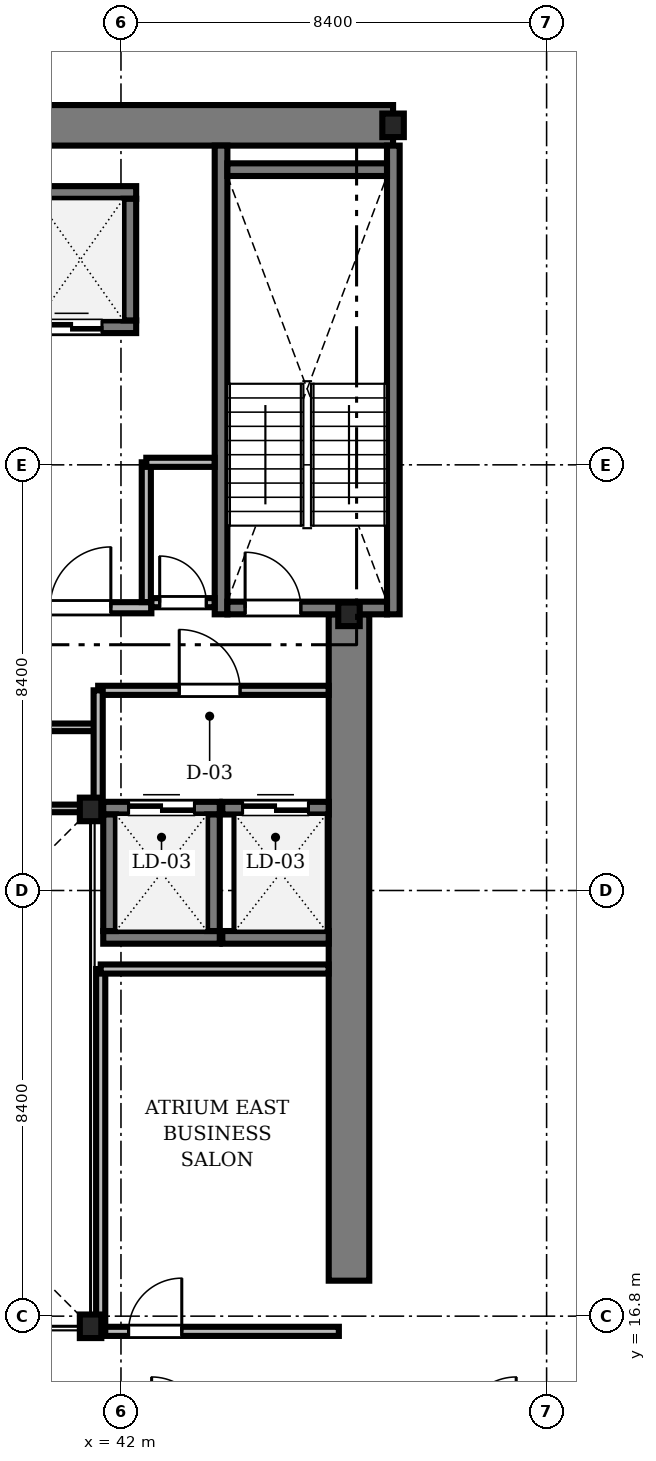
"""IFC4 building model, lengths in metres.
Left out: names, types, materials, properties, quantities, classifications, styles, units other than length and angle.
Written with IfcOpenShell. Run it as: python <this file> out.ifc"""

import sys

from ifc_helpers import new_model, si_unit, direction, frame, frame_2d, origin, origin_2d, place, context, subcontext, project, spatial, rectangle, i_section, extrude, source, transform, mapped, element, fill, save


model = new_model("IFC4")
c1 = context("Model", 3, precision=1e-05, world=origin(), true_north=direction((0.0, 1.0)))
c2 = subcontext(c1, "Body", "Model", "MODEL_VIEW")
j1 = project(units=[si_unit("LENGTHUNIT", "METRE"), si_unit("PLANEANGLEUNIT", "RADIAN")], contexts=[c1])
p1 = place(None, origin())
s1 = spatial("IfcSite", under=j1, at=p1, CompositionType="ELEMENT")
p2 = place(p1, origin())
s2 = spatial("IfcBuilding", under=s1, at=p2, CompositionType="ELEMENT")
p3 = place(p2, frame((0.0, 0.0, 107.5)))
s3 = spatial("IfcBuildingStorey", under=s2, at=p3, CompositionType="ELEMENT", Elevation=107.5)
m1 = source(origin(), c2, "Body", "SweptSolid", [
    extrude(rectangle(XDim=17.52, YDim=0.8, at=frame_2d((8.76, 0.0))), origin(), (0.0, 0.0, 1.0), 3.56),
])
p4 = place(p3, frame((29.85, 40.3, 0.0), z_axis=(0.0, 0.0, 1.0), x_axis=(1.0, 0.0, 0.0)))
e1 = element("IfcWall", 1, at=p4, inside=s3, PredefinedType="SHEAR", context=c2, shape_type="MappedRepresentation", body=[
    mapped(m1, transform((0.0, 0.0, 0.0), scale=1.0)),
])
m2 = source(origin(), c2, "Body", "SweptSolid", [
    extrude(rectangle(XDim=13.15, YDim=0.8, at=frame_2d((6.575, 0.0))), origin(), (0.0, 0.0, 1.0), 3.56),
])
p5 = place(p3, frame((46.5, 17.5, 0.0), z_axis=(0.0, 0.0, 1.0), x_axis=(0.0, 1.0, 0.0)))
e2 = element("IfcWall", 2, at=p5, inside=s3, PredefinedType="SHEAR", context=c2, shape_type="MappedRepresentation", body=[
    mapped(m2, transform((0.0, 0.0, 0.0), scale=1.0)),
])
m3 = source(origin(), c2, "Body", "SweptSolid", [
    extrude(i_section(OverallWidth=0.424, OverallDepth=0.465, WebThickness=0.035, FlangeThickness=0.056, FilletRadius=0.015, at=origin_2d()), origin(), (0.0, 0.0, 1.0), 3.56),
])
for number, where, z_axis, x_axis in (
    (3, (41.4, 16.6, 0.0), (0.0, 0.0, 1.0), (1.0, 0.0, 0.0)),
    (4, (41.4, 26.8, 0.0), (0.0, 0.0, 1.0), (1.0, 0.0, 0.0)),
    (5, (46.5, 30.65, 0.0), (0.0, 0.0, 1.0), (1.0, 0.0, 0.0)),
    (6, (47.37, 40.3, 0.0), (0.0, 0.0, 1.0), (1.0, 0.0, 0.0)),
):
    element("IfcColumn", number, at=place(p3, frame(where, z_axis=z_axis, x_axis=x_axis)), inside=s3, PredefinedType="COLUMN", context=c2, shape_type="MappedRepresentation", body=[
        mapped(m3, transform((0.0, 0.0, 0.0), scale=1.0)),
    ])
m4 = source(origin(), c2, "Body", "SweptSolid", [
    extrude(rectangle(XDim=9.25, YDim=0.25, at=frame_2d((4.625, 0.0))), origin(), (0.0, 0.0, 1.0), 3.6),
])
for number, where, z_axis, x_axis in (
    (7, (43.975, 30.65, 0.0), (0.0, 0.0, 1.0), (0.0, 1.0, 0.0)),
    (8, (47.375, 30.65, 0.0), (0.0, 0.0, 1.0), (0.0, 1.0, 0.0)),
):
    element("IfcWall", number, at=place(p3, frame(where, z_axis=z_axis, x_axis=x_axis)), inside=s3, PredefinedType="SOLIDWALL", context=c2, shape_type="MappedRepresentation", body=[
        mapped(m4, transform((0.0, 0.0, 0.0), scale=1.0)),
    ])
m5 = source(origin(), c2, "Body", "SweptSolid", [
    extrude(rectangle(XDim=3.15, YDim=0.25, at=frame_2d((1.575, 0.0))), origin(), (0.0, 0.0, 1.0), 3.6),
])
p6 = place(p3, frame((44.1, 39.425, 0.0), z_axis=(0.0, 0.0, 1.0), x_axis=(1.0, 0.0, 0.0)))
e9 = element("IfcWall", 9, at=p6, inside=s3, PredefinedType="SOLIDWALL", context=c2, shape_type="MappedRepresentation", body=[
    mapped(m5, transform((0.0, 0.0, 0.0), scale=1.0)),
])
p7 = place(p3, frame((44.1, 30.775, 0.0), z_axis=(0.0, 0.0, 1.0), x_axis=(1.0, 0.0, 0.0)))
e10 = element("IfcWall", 10, at=p7, inside=s3, PredefinedType="SOLIDWALL", context=c2, shape_type="MappedRepresentation", body=[
    mapped(m5, transform((0.0, 0.0, 0.0), scale=1.0)),
])
m6 = source(origin(), c2, "Body", "SweptSolid", [
    extrude(rectangle(XDim=1.1, YDim=2.2, at=frame_2d((0.55, 1.1))), frame((0.0, 0.135, 0.0), z_axis=(0.0, -1.0, 0.0), x_axis=(1.0, 0.0, 0.0)), (0.0, 0.0, 1.0), 0.27),
])
p8 = place(p7, frame((0.35, 0.0, 0.0)))
e11 = element("IfcOpeningElement", 11, at=p8, cuts=e10, PredefinedType="OPENING", context=c2, shape_type="MappedRepresentation", body=[
    mapped(m6, transform((0.0, 0.0, 0.0), scale=1.0)),
])
m7 = source(origin(), c2, "Body", "SweptSolid", [
    extrude(rectangle(XDim=2.8, YDim=0.22, at=frame_2d((1.4, 0.0))), origin(), (0.0, 0.0, 1.0), 3.56),
])
p9 = place(p3, frame((39.8, 30.78, 0.0), z_axis=(0.0, 0.0, 1.0), x_axis=(1.0, 0.0, 0.0)))
e12 = element("IfcWall", 12, at=p9, inside=s3, PredefinedType="SOLIDWALL", context=c2, shape_type="MappedRepresentation", body=[
    mapped(m7, transform((0.0, 0.0, 0.0), scale=1.0)),
])
m8 = source(origin(), c2, "Body", "SweptSolid", [
    extrude(rectangle(XDim=1.2, YDim=2.2, at=frame_2d((0.6, 1.1))), frame((0.0, 0.12, 0.0), z_axis=(0.0, -1.0, 0.0), x_axis=(1.0, 0.0, 0.0)), (0.0, 0.0, 1.0), 0.24),
])
p10 = place(p9, frame((0.8, 0.0, 0.0)))
e13 = element("IfcOpeningElement", 13, at=p10, cuts=e12, PredefinedType="OPENING", context=c2, shape_type="MappedRepresentation", body=[
    mapped(m8, transform((0.0, 0.0, 0.0), scale=1.0)),
])
m9 = source(origin(), c2, "Body", "SweptSolid", [
    extrude(rectangle(XDim=2.55, YDim=0.25, at=frame_2d((1.275, 0.0))), origin(), (0.0, 0.0, 1.0), 3.56),
])
p11 = place(p3, frame((39.75, 36.325, 0.0), z_axis=(0.0, 0.0, 1.0), x_axis=(1.0, 0.0, 0.0)))
e14 = element("IfcWall", 14, at=p11, inside=s3, PredefinedType="SOLIDWALL", context=c2, shape_type="MappedRepresentation", body=[
    mapped(m9, transform((0.0, 0.0, 0.0), scale=1.0)),
])
m10 = source(origin(), c2, "Body", "SweptSolid", [
    extrude(rectangle(XDim=1.2, YDim=2.25, at=frame_2d((0.6, 1.125))), frame((0.0, 0.135, 0.0), z_axis=(0.0, -1.0, 0.0), x_axis=(1.0, 0.0, 0.0)), (0.0, 0.0, 1.0), 0.27),
])
p12 = place(p11, frame((0.675, 0.0, 0.0)))
e15 = element("IfcOpeningElement", 15, at=p12, cuts=e14, PredefinedType="OPENING", context=c2, shape_type="MappedRepresentation", body=[
    mapped(m10, transform((0.0, 0.0, 0.0), scale=1.0)),
])
p13 = place(p3, frame((39.75, 38.975, 0.0), z_axis=(0.0, 0.0, 1.0), x_axis=(1.0, 0.0, 0.0)))
e16 = element("IfcWall", 16, at=p13, inside=s3, PredefinedType="SOLIDWALL", context=c2, shape_type="MappedRepresentation", body=[
    mapped(m9, transform((0.0, 0.0, 0.0), scale=1.0)),
])
m11 = source(origin(), c2, "Body", "SweptSolid", [
    extrude(rectangle(XDim=2.4, YDim=0.25, at=frame_2d((1.2, 0.0))), origin(), (0.0, 0.0, 1.0), 3.56),
])
p14 = place(p3, frame((42.175, 36.45, 0.0), z_axis=(0.0, 0.0, 1.0), x_axis=(0.0, 1.0, 0.0)))
e17 = element("IfcWall", 17, at=p14, inside=s3, PredefinedType="SOLIDWALL", context=c2, shape_type="MappedRepresentation", body=[
    mapped(m11, transform((0.0, 0.0, 0.0), scale=1.0)),
])
m12 = source(origin(), c2, "Body", "SweptSolid", [
    extrude(rectangle(XDim=2.3, YDim=0.25, at=frame_2d((1.15, 0.0))), origin(), (0.0, 0.0, 1.0), 3.56),
])
p15 = place(p3, frame((41.65, 24.275, 0.0), z_axis=(0.0, 0.0, 1.0), x_axis=(1.0, 0.0, 0.0)))
e18 = element("IfcWall", 18, at=p15, inside=s3, PredefinedType="SOLIDWALL", context=c2, shape_type="MappedRepresentation", body=[
    mapped(m12, transform((0.0, 0.0, 0.0), scale=1.0)),
])
p16 = place(p3, frame((41.65, 26.825, 0.0), z_axis=(0.0, 0.0, 1.0), x_axis=(1.0, 0.0, 0.0)))
e19 = element("IfcWall", 19, at=p16, inside=s3, PredefinedType="SOLIDWALL", context=c2, shape_type="MappedRepresentation", body=[
    mapped(m12, transform((0.0, 0.0, 0.0), scale=1.0)),
])
m13 = source(origin(), c2, "Body", "SweptSolid", [
    extrude(rectangle(XDim=1.3, YDim=2.3, at=frame_2d((0.65, 1.15))), frame((0.0, 0.135, 0.0), z_axis=(0.0, -1.0, 0.0), x_axis=(1.0, 0.0, 0.0)), (0.0, 0.0, 1.0), 0.27),
])
p17 = place(p16, frame((0.5, 0.0, 0.0)))
e20 = element("IfcOpeningElement", 20, at=p17, cuts=e19, PredefinedType="OPENING", context=c2, shape_type="MappedRepresentation", body=[
    mapped(m13, transform((0.0, 0.0, 0.0), scale=1.0)),
])
for number, where, z_axis, x_axis in (
    (21, (41.775, 24.4, 0.0), (0.0, 0.0, 1.0), (0.0, 1.0, 0.0)),
    (22, (43.825, 24.4, 0.0), (0.0, 0.0, 1.0), (0.0, 1.0, 0.0)),
):
    element("IfcWall", number, at=place(p3, frame(where, z_axis=z_axis, x_axis=x_axis)), inside=s3, PredefinedType="SOLIDWALL", context=c2, shape_type="MappedRepresentation", body=[
        mapped(m12, transform((0.0, 0.0, 0.0), scale=1.0)),
    ])
m14 = source(origin(), c2, "Body", "SweptSolid", [
    extrude(rectangle(XDim=2.1, YDim=0.25, at=frame_2d((1.05, 0.0))), origin(), (0.0, 0.0, 1.0), 3.56),
])
p18 = place(p3, frame((44.0, 24.275, 0.0), z_axis=(0.0, 0.0, 1.0), x_axis=(1.0, 0.0, 0.0)))
e23 = element("IfcWall", 23, at=p18, inside=s3, PredefinedType="SOLIDWALL", context=c2, shape_type="MappedRepresentation", body=[
    mapped(m14, transform((0.0, 0.0, 0.0), scale=1.0)),
])
p19 = place(p3, frame((44.0, 26.825, 0.0), z_axis=(0.0, 0.0, 1.0), x_axis=(1.0, 0.0, 0.0)))
e24 = element("IfcWall", 24, at=p19, inside=s3, PredefinedType="SOLIDWALL", context=c2, shape_type="MappedRepresentation", body=[
    mapped(m14, transform((0.0, 0.0, 0.0), scale=1.0)),
])
p20 = place(p19, frame((0.4, 0.0, 0.0)))
e25 = element("IfcOpeningElement", 25, at=p20, cuts=e24, PredefinedType="OPENING", context=c2, shape_type="MappedRepresentation", body=[
    mapped(m13, transform((0.0, 0.0, 0.0), scale=1.0)),
])
m15 = source(origin(), c2, "Body", "SweptSolid", [
    extrude(rectangle(XDim=4.548, YDim=0.18, at=frame_2d((2.274, 0.0))), origin(), (0.0, 0.0, 1.0), 3.192),
])
p21 = place(p3, frame((41.55, 29.15, 0.0), z_axis=(0.0, 0.0, 1.0), x_axis=(1.0, 0.0, 0.0)))
e26 = element("IfcWall", 26, at=p21, inside=s3, PredefinedType="PARTITIONING", context=c2, shape_type="MappedRepresentation", body=[
    mapped(m15, transform((0.0, 0.0, 0.0), scale=1.0)),
])
m16 = source(origin(), c2, "Body", "SweptSolid", [
    extrude(rectangle(XDim=1.2, YDim=2.2, at=frame_2d((0.6, 1.1))), frame((0.0, 0.1, 0.0), z_axis=(0.0, -1.0, 0.0), x_axis=(1.0, 0.0, 0.0)), (0.0, 0.0, 1.0), 0.2),
])
p22 = place(p21, frame((1.6, 0.0, 0.0)))
e27 = element("IfcOpeningElement", 27, at=p22, cuts=e26, PredefinedType="OPENING", context=c2, shape_type="MappedRepresentation", body=[
    mapped(m16, transform((0.0, 0.0, 0.0), scale=1.0)),
])
m17 = source(origin(), c2, "Body", "SweptSolid", [
    extrude(rectangle(XDim=4.7, YDim=0.18, at=frame_2d((2.35, 0.0))), origin(), (0.0, 0.0, 1.0), 2.952),
])
p23 = place(p3, frame((41.6, 16.5, 0.0), z_axis=(0.0, 0.0, 1.0), x_axis=(1.0, 0.0, 0.0)))
e28 = element("IfcWall", 28, at=p23, inside=s3, PredefinedType="PARTITIONING", context=c2, shape_type="MappedRepresentation", body=[
    mapped(m17, transform((0.0, 0.0, 0.0), scale=1.0)),
])
m18 = source(origin(), c2, "Body", "SweptSolid", [
    extrude(rectangle(XDim=1.05, YDim=2.2, at=frame_2d((0.525, 1.1))), frame((0.0, 0.1, 0.0), z_axis=(0.0, -1.0, 0.0), x_axis=(1.0, 0.0, 0.0)), (0.0, 0.0, 1.0), 0.2),
])
p24 = place(p23, frame((0.55, 0.0, 0.0)))
e29 = element("IfcOpeningElement", 29, at=p24, cuts=e28, PredefinedType="OPENING", context=c2, shape_type="MappedRepresentation", body=[
    mapped(m18, transform((0.0, 0.0, 0.0), scale=1.0)),
])
m19 = source(origin(), c2, "Body", "SweptSolid", [
    extrude(rectangle(XDim=2.74, YDim=0.15, at=frame_2d((1.37, 0.0))), origin(), (0.0, 0.0, 1.0), 3.56),
])
p25 = place(p3, frame((38.78, 28.42, 0.0), z_axis=(0.0, 0.0, 1.0), x_axis=(1.0, 0.0, 0.0)))
e30 = element("IfcWall", 30, at=p25, inside=s3, PredefinedType="PARTITIONING", context=c2, shape_type="MappedRepresentation", body=[
    mapped(m19, transform((0.0, 0.0, 0.0), scale=1.0)),
])
m20 = source(origin(), c2, "Body", "SweptSolid", [
    extrude(rectangle(XDim=0.92, YDim=2.1, at=frame_2d((0.46, 1.05))), frame((0.0, 0.085, 0.0), z_axis=(0.0, -1.0, 0.0), x_axis=(1.0, 0.0, 0.0)), (0.0, 0.0, 1.0), 0.17),
])
p26 = place(p25, frame((0.63, 0.0, 0.0)))
e31 = element("IfcOpeningElement", 31, at=p26, cuts=e30, PredefinedType="OPENING", context=c2, shape_type="MappedRepresentation", body=[
    mapped(m20, transform((0.0, 0.0, 0.0), scale=1.0)),
])
m21 = source(origin(), c2, "Body", "SweptSolid", [
    extrude(rectangle(XDim=1.248, YDim=0.18, at=frame_2d((0.624, 0.0))), origin(), (0.0, 0.0, 1.0), 3.56),
])
p27 = place(p3, frame((42.6, 30.88, 0.0), z_axis=(0.0, 0.0, 1.0), x_axis=(1.0, 0.0, 0.0)))
e32 = element("IfcWall", 32, at=p27, inside=s3, PredefinedType="PARTITIONING", context=c2, shape_type="MappedRepresentation", body=[
    mapped(m21, transform((0.0, 0.0, 0.0), scale=1.0)),
])
m22 = source(origin(), c2, "Body", "SweptSolid", [
    extrude(rectangle(XDim=0.92, YDim=2.1, at=frame_2d((0.46, 1.05))), frame((0.0, 0.1, 0.0), z_axis=(0.0, -1.0, 0.0), x_axis=(1.0, 0.0, 0.0)), (0.0, 0.0, 1.0), 0.2),
])
p28 = place(p27, frame((0.164, 0.0, 0.0)))
e33 = element("IfcOpeningElement", 33, at=p28, cuts=e32, PredefinedType="OPENING", context=c2, shape_type="MappedRepresentation", body=[
    mapped(m22, transform((0.0, 0.0, 0.0), scale=1.0)),
])
m23 = source(origin(), c2, "Body", "SweptSolid", [
    extrude(rectangle(XDim=7.15, YDim=0.18, at=frame_2d((3.575, 0.0))), origin(), (0.0, 0.0, 1.0), 2.952),
])
p29 = place(p3, frame((41.6, 16.5, 0.0), z_axis=(0.0, 0.0, 1.0), x_axis=(0.0, 1.0, 0.0)))
e34 = element("IfcWall", 34, at=p29, inside=s3, PredefinedType="PARTITIONING", context=c2, shape_type="MappedRepresentation", body=[
    mapped(m23, transform((0.0, 0.0, 0.0), scale=1.0)),
])
m24 = source(origin(), c2, "Body", "SweptSolid", [
    extrude(rectangle(XDim=4.498, YDim=0.18, at=frame_2d((2.249, 0.0))), origin(), (0.0, 0.0, 1.0), 3.56),
])
p30 = place(p3, frame((41.6, 23.65, 0.0), z_axis=(0.0, 0.0, 1.0), x_axis=(1.0, 0.0, 0.0)))
e35 = element("IfcWall", 35, at=p30, inside=s3, PredefinedType="PARTITIONING", context=c2, shape_type="MappedRepresentation", body=[
    mapped(m24, transform((0.0, 0.0, 0.0), scale=1.0)),
])
m25 = source(origin(), c2, "Body", "SweptSolid", [
    extrude(rectangle(XDim=2.758, YDim=0.18, at=frame_2d((1.379, 0.0))), origin(), (0.0, 0.0, 1.0), 3.56),
])
p31 = place(p3, frame((42.5, 30.892, 0.0), z_axis=(0.0, 0.0, 1.0), x_axis=(0.0, 1.0, 0.0)))
e36 = element("IfcWall", 36, at=p31, inside=s3, PredefinedType="PARTITIONING", context=c2, shape_type="MappedRepresentation", body=[
    mapped(m25, transform((0.0, 0.0, 0.0), scale=1.0)),
])
m26 = source(origin(), c2, "Body", "SweptSolid", [
    extrude(rectangle(XDim=2.74, YDim=0.15, at=frame_2d((1.37, 0.0))), origin(), (0.0, 0.0, 1.0), 2.952),
])
p32 = place(p3, frame((38.78, 26.82, 0.0), z_axis=(0.0, 0.0, 1.0), x_axis=(1.0, 0.0, 0.0)))
e37 = element("IfcWall", 37, at=p32, inside=s3, PredefinedType="PARTITIONING", context=c2, shape_type="MappedRepresentation", body=[
    mapped(m26, transform((0.0, 0.0, 0.0), scale=1.0)),
])
m27 = source(origin(), c2, "Body", "SweptSolid", [
    extrude(rectangle(XDim=2.35, YDim=0.18, at=frame_2d((1.175, 0.0))), origin(), (0.0, 0.0, 1.0), 2.952),
])
p33 = place(p3, frame((41.55, 26.8, 0.0), z_axis=(0.0, 0.0, 1.0), x_axis=(0.0, 1.0, 0.0)))
e38 = element("IfcWall", 38, at=p33, inside=s3, PredefinedType="PARTITIONING", context=c2, shape_type="MappedRepresentation", body=[
    mapped(m27, transform((0.0, 0.0, 0.0), scale=1.0)),
])
m28 = source(origin(), c2, "Body", "SweptSolid", [
    extrude(rectangle(XDim=1.348, YDim=0.18, at=frame_2d((0.674, 0.0))), origin(), (0.0, 0.0, 1.0), 3.56),
])
p34 = place(p3, frame((42.5, 33.65, 0.0), z_axis=(0.0, 0.0, 1.0), x_axis=(1.0, 0.0, 0.0)))
e39 = element("IfcWall", 39, at=p34, inside=s3, PredefinedType="PARTITIONING", context=c2, shape_type="MappedRepresentation", body=[
    mapped(m28, transform((0.0, 0.0, 0.0), scale=1.0)),
])
m29 = source(origin(), c2, "Body", "SweptSolid", [
    extrude(rectangle(XDim=1.1, YDim=2.2, at=frame_2d((0.55, 1.1))), frame((0.0, 0.025, 0.0), z_axis=(0.0, -1.0, 0.0), x_axis=(1.0, 0.0, 0.0)), (0.0, 0.0, 1.0), 0.05),
])
p35 = place(p8, origin())
e40 = element("IfcDoor", 40, at=p35, inside=s3, OperationType="SINGLE_SWING_LEFT", PredefinedType="DOOR", context=c2, shape_type="MappedRepresentation", body=[
    mapped(m29, transform((0.0, 0.0, 0.0), scale=1.0)),
])
fill(e11, e40)
m30 = source(origin(), c2, "Body", "SweptSolid", [
    extrude(rectangle(XDim=1.2, YDim=2.2, at=frame_2d((0.6, 1.1))), frame((0.0, 0.025, 0.0), z_axis=(0.0, -1.0, 0.0), x_axis=(1.0, 0.0, 0.0)), (0.0, 0.0, 1.0), 0.05),
])
p36 = place(p10, origin())
e41 = element("IfcDoor", 41, at=p36, inside=s3, OperationType="SINGLE_SWING_RIGHT", PredefinedType="DOOR", context=c2, shape_type="MappedRepresentation", body=[
    mapped(m30, transform((0.0, 0.0, 0.0), scale=1.0)),
])
fill(e13, e41)
m31 = source(origin(), c2, "Body", "SweptSolid", [
    extrude(rectangle(XDim=1.2, YDim=2.25, at=frame_2d((0.6, 1.125))), frame((0.0, 0.025, 0.0), z_axis=(0.0, -1.0, 0.0), x_axis=(1.0, 0.0, 0.0)), (0.0, 0.0, 1.0), 0.05),
])
p37 = place(p12, origin())
e42 = element("IfcDoor", 42, at=p37, inside=s3, OperationType="DOUBLE_DOOR_SLIDING", PredefinedType="DOOR", context=c2, shape_type="MappedRepresentation", body=[
    mapped(m31, transform((0.0, 0.0, 0.0), scale=1.0)),
])
fill(e15, e42)
m32 = source(origin(), c2, "Body", "SweptSolid", [
    extrude(rectangle(XDim=1.3, YDim=2.3, at=frame_2d((0.65, 1.15))), frame((0.0, 0.025, 0.0), z_axis=(0.0, -1.0, 0.0), x_axis=(1.0, 0.0, 0.0)), (0.0, 0.0, 1.0), 0.05),
])
p38 = place(p17, origin())
e43 = element("IfcDoor", 43, at=p38, inside=s3, OperationType="DOUBLE_DOOR_SLIDING", PredefinedType="DOOR", context=c2, shape_type="MappedRepresentation", body=[
    mapped(m32, transform((0.0, 0.0, 0.0), scale=1.0)),
])
fill(e20, e43)
p39 = place(p20, origin())
e44 = element("IfcDoor", 44, at=p39, inside=s3, OperationType="DOUBLE_DOOR_SLIDING", PredefinedType="DOOR", context=c2, shape_type="MappedRepresentation", body=[
    mapped(m32, transform((0.0, 0.0, 0.0), scale=1.0)),
])
fill(e25, e44)
p40 = place(p22, origin())
e45 = element("IfcDoor", 45, at=p40, inside=s3, OperationType="SINGLE_SWING_LEFT", PredefinedType="DOOR", context=c2, shape_type="MappedRepresentation", body=[
    mapped(m30, transform((0.0, 0.0, 0.0), scale=1.0)),
])
fill(e27, e45)
m33 = source(origin(), c2, "Body", "SweptSolid", [
    extrude(rectangle(XDim=1.05, YDim=2.2, at=frame_2d((0.525, 1.1))), frame((0.0, 0.025, 0.0), z_axis=(0.0, -1.0, 0.0), x_axis=(1.0, 0.0, 0.0)), (0.0, 0.0, 1.0), 0.05),
])
p41 = place(p24, origin())
e46 = element("IfcDoor", 46, at=p41, inside=s3, OperationType="SINGLE_SWING_RIGHT", PredefinedType="DOOR", context=c2, shape_type="MappedRepresentation", body=[
    mapped(m33, transform((0.0, 0.0, 0.0), scale=1.0)),
])
fill(e29, e46)
m34 = source(origin(), c2, "Body", "SweptSolid", [
    extrude(rectangle(XDim=0.92, YDim=2.1, at=frame_2d((0.46, 1.05))), frame((0.0, 0.025, 0.0), z_axis=(0.0, -1.0, 0.0), x_axis=(1.0, 0.0, 0.0)), (0.0, 0.0, 1.0), 0.05),
])
p42 = place(p28, origin())
e47 = element("IfcDoor", 47, at=p42, inside=s3, OperationType="SINGLE_SWING_LEFT", PredefinedType="DOOR", context=c2, shape_type="MappedRepresentation", body=[
    mapped(m34, transform((0.0, 0.0, 0.0), scale=1.0)),
])
fill(e33, e47)
save(model, sys.argv[1])
